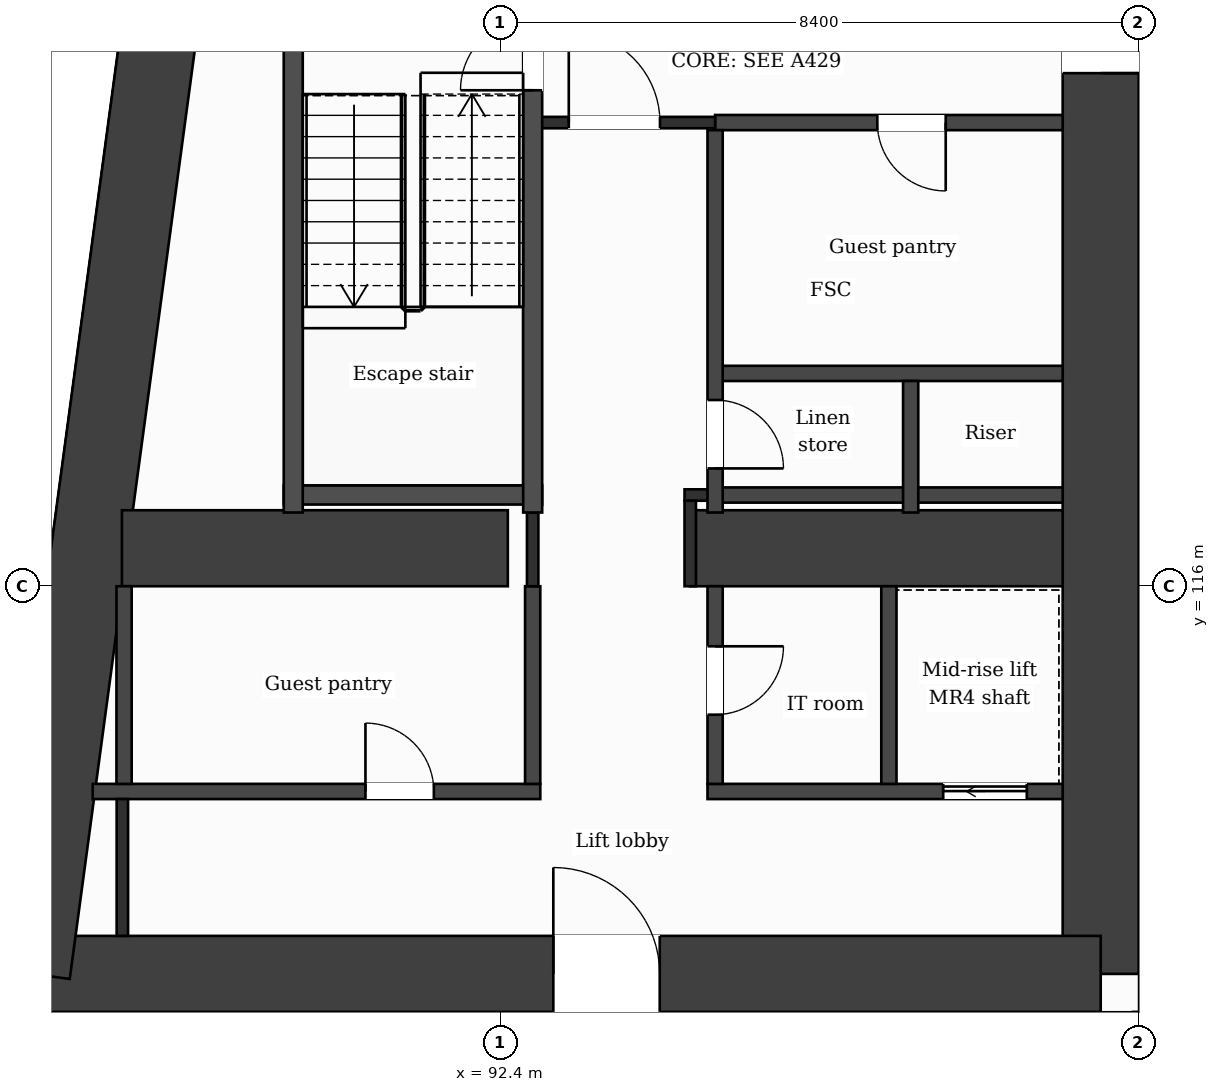
"""IFC4 building model, lengths in metres.
Left out: names, types, materials, properties, quantities, classifications, styles, units other than length and angle.
Written with IfcOpenShell. Run it as: python <this file> out.ifc"""

import sys

from ifc_helpers import new_model, si_unit, direction, frame, frame_2d, origin, place, context, subcontext, project, spatial, rectangle, extrude, element, fill, save


model = new_model("IFC4")
c1 = context("Model", 3, precision=1e-05, world=origin(), true_north=direction((0.0, 1.0)))
c2 = subcontext(c1, "Body", "Model", "MODEL_VIEW")
j1 = project(units=[si_unit("LENGTHUNIT", "METRE"), si_unit("PLANEANGLEUNIT", "RADIAN")], contexts=[c1])
p1 = place(None, origin())
s1 = spatial("IfcSite", under=j1, at=p1, CompositionType="ELEMENT")
p2 = place(p1, origin())
s2 = spatial("IfcBuilding", under=s1, at=p2, CompositionType="ELEMENT")
p3 = place(p2, frame((0.0, 0.0, 120.6)))
s3 = spatial("IfcBuildingStorey", under=s2, at=p3, CompositionType="ELEMENT", Elevation=120.6)
p4 = place(p3, frame((100.3, 131.9, 0.0), z_axis=(0.0, 0.0, 1.0), x_axis=(0.0, -1.0, 0.0)))
e1 = element("IfcWall", 1, at=p4, inside=s3, PredefinedType="SHEAR", context=c2, shape_type="SweptSolid", body=[
    extrude(rectangle(XDim=21.0, YDim=1.0, at=frame_2d((10.5, 0.0))), origin(), (0.0, 0.0, 1.0), 3.7),
])
p5 = place(p4, frame((7.75, 0.0, 0.0)))
e2 = element("IfcOpeningElement", 2, at=p5, cuts=e1, PredefinedType="OPENING", context=c2, shape_type="SweptSolid", body=[
    extrude(rectangle(XDim=1.4, YDim=2.1, at=frame_2d((0.7, 1.05))), frame((0.0, 0.51, 0.0), z_axis=(0.0, -1.0, 0.0), x_axis=(1.0, 0.0, 0.0)), (0.0, 0.0, 1.0), 1.02),
])
p6 = place(p3, frame((100.3, 110.9, 0.0), z_axis=(0.0, 0.0, 1.0), x_axis=(-1.0, 0.0, 0.0)))
e3 = element("IfcWall", 3, at=p6, inside=s3, PredefinedType="SHEAR", context=c2, shape_type="SweptSolid", body=[
    extrude(rectangle(XDim=14.059, YDim=1.0, at=frame_2d((7.03, 0.0))), origin(), (0.0, 0.0, 1.0), 3.7),
])
p7 = place(p6, frame((5.802, 0.0, 0.0)))
e4 = element("IfcOpeningElement", 4, at=p7, cuts=e3, PredefinedType="OPENING", context=c2, shape_type="SweptSolid", body=[
    extrude(rectangle(XDim=1.4, YDim=2.1, at=frame_2d((0.7, 1.05))), frame((0.0, 0.51, 0.0), z_axis=(0.0, -1.0, 0.0), x_axis=(1.0, 0.0, 0.0)), (0.0, 0.0, 1.0), 1.02),
])
p8 = place(p3, frame((86.241, 110.9, 0.0), z_axis=(0.0, 0.0, 1.0), x_axis=(0.133411141623, 0.991060778808, 0.0)))
e5 = element("IfcWall", 5, at=p8, inside=s3, PredefinedType="SHEAR", context=c2, shape_type="SweptSolid", body=[
    extrude(rectangle(XDim=21.189, YDim=1.0, at=frame_2d((10.595, 0.0))), origin(), (0.0, 0.0, 1.0), 3.7),
])
p9 = place(p3, frame((87.423, 116.5, 0.0), z_axis=(0.0, 0.0, 1.0), x_axis=(1.0, 0.0, 0.0)))
e6 = element("IfcWall", 6, at=p9, inside=s3, PredefinedType="SHEAR", context=c2, shape_type="SweptSolid", body=[
    extrude(rectangle(XDim=5.077, YDim=1.0, at=frame_2d((2.539, 0.0))), origin(), (0.0, 0.0, 1.0), 3.7),
])
p10 = place(p3, frame((94.9, 116.5, 0.0), z_axis=(0.0, 0.0, 1.0), x_axis=(1.0, 0.0, 0.0)))
e7 = element("IfcWall", 7, at=p10, inside=s3, PredefinedType="SHEAR", context=c2, shape_type="SweptSolid", body=[
    extrude(rectangle(XDim=4.9, YDim=1.0, at=frame_2d((2.45, 0.0))), origin(), (0.0, 0.0, 1.0), 3.7),
])
p11 = place(p3, frame((87.334, 110.4, 0.0), z_axis=(0.0, 0.0, 1.0), x_axis=(-0.133437175554, -0.991057273915, 0.0)))
e8 = element("IfcWall", 8, at=p11, inside=s3, PredefinedType="SOLIDWALL", context=c2, shape_type="SweptSolid", body=[
    extrude(rectangle(XDim=6.781, YDim=0.3, at=frame_2d((3.39, 0.0))), origin(), (0.0, 0.0, 1.0), 3.38),
])
p12 = place(p11, frame((1.418, 0.0, 0.0)))
e9 = element("IfcOpeningElement", 9, at=p12, cuts=e8, PredefinedType="OPENING", context=c2, shape_type="SweptSolid", body=[
    extrude(rectangle(XDim=1.2, YDim=2.4, at=frame_2d((0.6, 1.2))), frame((0.0, 0.16, 0.0), z_axis=(0.0, -1.0, 0.0), x_axis=(1.0, 0.0, 0.0)), (0.0, 0.0, 1.0), 0.32),
])
p13 = place(p11, frame((4.758, 0.0, 0.9)))
e10 = element("IfcOpeningElement", 10, at=p13, cuts=e8, PredefinedType="OPENING", context=c2, shape_type="SweptSolid", body=[
    extrude(rectangle(XDim=1.2, YDim=2.1, at=frame_2d((0.6, 1.05))), frame((0.0, 0.16, 0.0), z_axis=(0.0, -1.0, 0.0), x_axis=(1.0, 0.0, 0.0)), (0.0, 0.0, 1.0), 0.32),
])
p14 = place(p3, frame((87.039, 113.3, 0.0), z_axis=(0.0, 0.0, 1.0), x_axis=(1.0, 0.0, 0.0)))
e11 = element("IfcWall", 11, at=p14, inside=s3, PredefinedType="PARTITIONING", context=c2, shape_type="SweptSolid", body=[
    extrude(rectangle(XDim=5.888, YDim=0.2, at=frame_2d((2.944, 0.0))), origin(), (0.0, 0.0, 1.0), 3.38),
])
p15 = place(p14, frame((3.588, 0.0, 0.0)))
e12 = element("IfcOpeningElement", 12, at=p15, cuts=e11, PredefinedType="OPENING", context=c2, shape_type="SweptSolid", body=[
    extrude(rectangle(XDim=0.9, YDim=2.1, at=frame_2d((0.45, 1.05))), frame((0.0, 0.11, 0.0), z_axis=(0.0, -1.0, 0.0), x_axis=(1.0, 0.0, 0.0)), (0.0, 0.0, 1.0), 0.22),
])
p16 = place(p3, frame((95.127, 113.3, 0.0), z_axis=(0.0, 0.0, 1.0), x_axis=(1.0, 0.0, 0.0)))
e13 = element("IfcWall", 13, at=p16, inside=s3, PredefinedType="PARTITIONING", context=c2, shape_type="SweptSolid", body=[
    extrude(rectangle(XDim=4.673, YDim=0.2, at=frame_2d((2.336, 0.0))), origin(), (0.0, 0.0, 1.0), 3.38),
])
p17 = place(p16, frame((3.101, 0.0, 0.0)))
e14 = element("IfcOpeningElement", 14, at=p17, cuts=e13, PredefinedType="OPENING", context=c2, shape_type="SweptSolid", body=[
    extrude(rectangle(XDim=1.1, YDim=2.1, at=frame_2d((0.55, 1.05))), frame((0.0, 0.11, 0.0), z_axis=(0.0, -1.0, 0.0), x_axis=(1.0, 0.0, 0.0)), (0.0, 0.0, 1.0), 0.22),
])
p18 = place(p3, frame((95.227, 117.2, 0.0), z_axis=(0.0, 0.0, 1.0), x_axis=(1.0, 0.0, 0.0)))
e15 = element("IfcWall", 15, at=p18, inside=s3, PredefinedType="PARTITIONING", context=c2, shape_type="SweptSolid", body=[
    extrude(rectangle(XDim=4.573, YDim=0.2, at=frame_2d((2.287, 0.0))), origin(), (0.0, 0.0, 1.0), 3.38),
])
p19 = place(p3, frame((94.825, 117.2, 0.0), z_axis=(0.0, 0.0, 1.0), x_axis=(1.0, 0.0, 0.0)))
e16 = element("IfcWall", 16, at=p19, inside=s3, PredefinedType="PARTITIONING", context=c2, shape_type="SweptSolid", body=[
    extrude(rectangle(XDim=0.402, YDim=0.15, at=frame_2d((0.201, 0.0))), origin(), (0.0, 0.0, 1.0), 3.38),
])
p20 = place(p3, frame((89.552, 117.2, 0.0), z_axis=(0.0, 0.0, 1.0), x_axis=(1.0, 0.0, 0.0)))
e17 = element("IfcWall", 17, at=p20, inside=s3, PredefinedType="PARTITIONING", context=c2, shape_type="SweptSolid", body=[
    extrude(rectangle(XDim=3.4, YDim=0.25, at=frame_2d((1.7, 0.0))), origin(), (0.0, 0.0, 1.0), 3.38),
])
p21 = place(p3, frame((95.227, 118.8, 0.0), z_axis=(0.0, 0.0, 1.0), x_axis=(1.0, 0.0, 0.0)))
e18 = element("IfcWall", 18, at=p21, inside=s3, PredefinedType="PARTITIONING", context=c2, shape_type="SweptSolid", body=[
    extrude(rectangle(XDim=4.573, YDim=0.2, at=frame_2d((2.287, 0.0))), origin(), (0.0, 0.0, 1.0), 3.38),
])
p22 = place(p3, frame((95.227, 122.1, 0.0), z_axis=(0.0, 0.0, 1.0), x_axis=(1.0, 0.0, 0.0)))
e19 = element("IfcWall", 19, at=p22, inside=s3, PredefinedType="PARTITIONING", context=c2, shape_type="SweptSolid", body=[
    extrude(rectangle(XDim=4.573, YDim=0.2, at=frame_2d((2.287, 0.0))), origin(), (0.0, 0.0, 1.0), 3.38),
])
p23 = place(p22, frame((2.134, 0.0, 0.0)))
e20 = element("IfcOpeningElement", 20, at=p23, cuts=e19, PredefinedType="OPENING", context=c2, shape_type="SweptSolid", body=[
    extrude(rectangle(XDim=0.9, YDim=2.1, at=frame_2d((0.45, 1.05))), frame((0.0, 0.11, 0.0), z_axis=(0.0, -1.0, 0.0), x_axis=(1.0, 0.0, 0.0)), (0.0, 0.0, 1.0), 0.22),
])
p24 = place(p3, frame((92.827, 122.1, 0.0), z_axis=(0.0, 0.0, 1.0), x_axis=(1.0, 0.0, 0.0)))
e21 = element("IfcWall", 21, at=p24, inside=s3, PredefinedType="PARTITIONING", context=c2, shape_type="SweptSolid", body=[
    extrude(rectangle(XDim=2.4, YDim=0.15, at=frame_2d((1.2, 0.0))), origin(), (0.0, 0.0, 1.0), 3.38),
])
p25 = place(p24, frame((0.475, 0.0, 0.0)))
e22 = element("IfcOpeningElement", 22, at=p25, cuts=e21, PredefinedType="OPENING", context=c2, shape_type="SweptSolid", body=[
    extrude(rectangle(XDim=1.2, YDim=2.1, at=frame_2d((0.6, 1.05))), frame((0.0, 0.085, 0.0), z_axis=(0.0, -1.0, 0.0), x_axis=(1.0, 0.0, 0.0)), (0.0, 0.0, 1.0), 0.17),
])
p26 = place(p3, frame((87.451, 113.4, 0.0), z_axis=(0.0, 0.0, 1.0), x_axis=(0.0, 1.0, 0.0)))
e23 = element("IfcWall", 23, at=p26, inside=s3, PredefinedType="PARTITIONING", context=c2, shape_type="SweptSolid", body=[
    extrude(rectangle(XDim=2.6, YDim=0.2, at=frame_2d((1.3, 0.0))), origin(), (0.0, 0.0, 1.0), 3.38),
])
p27 = place(p3, frame((87.429, 111.4, 0.0), z_axis=(0.0, 0.0, 1.0), x_axis=(0.0, 1.0, 0.0)))
e24 = element("IfcWall", 24, at=p27, inside=s3, PredefinedType="PARTITIONING", context=c2, shape_type="SweptSolid", body=[
    extrude(rectangle(XDim=1.8, YDim=0.15, at=frame_2d((0.9, 0.0))), origin(), (0.0, 0.0, 1.0), 3.38),
])
p28 = place(p3, frame((89.677, 116.97, 0.0), z_axis=(0.0, 0.0, 1.0), x_axis=(0.0, 1.0, 0.0)))
e25 = element("IfcWall", 25, at=p28, inside=s3, PredefinedType="PARTITIONING", context=c2, shape_type="SweptSolid", body=[
    extrude(rectangle(XDim=6.855, YDim=0.25, at=frame_2d((3.427, 0.0))), origin(), (0.0, 0.0, 1.0), 3.38),
])
p29 = place(p3, frame((92.827, 113.4, 0.0), z_axis=(0.0, 0.0, 1.0), x_axis=(0.0, 1.0, 0.0)))
e26 = element("IfcWall", 26, at=p29, inside=s3, PredefinedType="PARTITIONING", context=c2, shape_type="SweptSolid", body=[
    extrude(rectangle(XDim=2.6, YDim=0.2, at=frame_2d((1.3, 0.0))), origin(), (0.0, 0.0, 1.0), 3.38),
])
p30 = place(p3, frame((92.827, 116.0, 0.0), z_axis=(0.0, 0.0, 1.0), x_axis=(0.0, 1.0, 0.0)))
e27 = element("IfcWall", 27, at=p30, inside=s3, PredefinedType="PARTITIONING", context=c2, shape_type="SweptSolid", body=[
    extrude(rectangle(XDim=0.97, YDim=0.15, at=frame_2d((0.485, 0.0))), origin(), (0.0, 0.0, 1.0), 3.38),
])
p31 = place(p3, frame((92.827, 116.97, 0.0), z_axis=(0.0, 0.0, 1.0), x_axis=(0.0, 1.0, 0.0)))
e28 = element("IfcWall", 28, at=p31, inside=s3, PredefinedType="PARTITIONING", context=c2, shape_type="SweptSolid", body=[
    extrude(rectangle(XDim=6.855, YDim=0.25, at=frame_2d((3.427, 0.0))), origin(), (0.0, 0.0, 1.0), 3.38),
])
p32 = place(p31, frame((5.555, 0.0, 0.0)))
e29 = element("IfcOpeningElement", 29, at=p32, cuts=e28, PredefinedType="OPENING", context=c2, shape_type="SweptSolid", body=[
    extrude(rectangle(XDim=0.95, YDim=2.1, at=frame_2d((0.475, 1.05))), frame((0.0, 0.135, 0.0), z_axis=(0.0, -1.0, 0.0), x_axis=(1.0, 0.0, 0.0)), (0.0, 0.0, 1.0), 0.27),
])
p33 = place(p3, frame((94.9, 116.0, 0.0), z_axis=(0.0, 0.0, 1.0), x_axis=(0.0, 1.0, 0.0)))
e30 = element("IfcWall", 30, at=p33, inside=s3, PredefinedType="PARTITIONING", context=c2, shape_type="SweptSolid", body=[
    extrude(rectangle(XDim=1.125, YDim=0.15, at=frame_2d((0.562, 0.0))), origin(), (0.0, 0.0, 1.0), 3.38),
])
p34 = place(p3, frame((95.227, 113.4, 0.0), z_axis=(0.0, 0.0, 1.0), x_axis=(0.0, 1.0, 0.0)))
e31 = element("IfcWall", 31, at=p34, inside=s3, PredefinedType="PARTITIONING", context=c2, shape_type="SweptSolid", body=[
    extrude(rectangle(XDim=2.6, YDim=0.2, at=frame_2d((1.3, 0.0))), origin(), (0.0, 0.0, 1.0), 3.38),
])
p35 = place(p34, frame((0.91, 0.0, 0.0)))
e32 = element("IfcOpeningElement", 32, at=p35, cuts=e31, PredefinedType="OPENING", context=c2, shape_type="SweptSolid", body=[
    extrude(rectangle(XDim=0.9, YDim=2.1, at=frame_2d((0.45, 1.05))), frame((0.0, 0.11, 0.0), z_axis=(0.0, -1.0, 0.0), x_axis=(1.0, 0.0, 0.0)), (0.0, 0.0, 1.0), 0.22),
])
p36 = place(p3, frame((95.227, 116.97, 0.0), z_axis=(0.0, 0.0, 1.0), x_axis=(0.0, 1.0, 0.0)))
e33 = element("IfcWall", 33, at=p36, inside=s3, PredefinedType="PARTITIONING", context=c2, shape_type="SweptSolid", body=[
    extrude(rectangle(XDim=5.03, YDim=0.2, at=frame_2d((2.515, 0.0))), origin(), (0.0, 0.0, 1.0), 3.38),
])
p37 = place(p36, frame((0.58, 0.0, 0.0)))
e34 = element("IfcOpeningElement", 34, at=p37, cuts=e33, PredefinedType="OPENING", context=c2, shape_type="SweptSolid", body=[
    extrude(rectangle(XDim=0.9, YDim=2.1, at=frame_2d((0.45, 1.05))), frame((0.0, 0.11, 0.0), z_axis=(0.0, -1.0, 0.0), x_axis=(1.0, 0.0, 0.0)), (0.0, 0.0, 1.0), 0.22),
])
p38 = place(p3, frame((97.513, 113.4, 0.0), z_axis=(0.0, 0.0, 1.0), x_axis=(0.0, 1.0, 0.0)))
e35 = element("IfcWall", 35, at=p38, inside=s3, PredefinedType="PARTITIONING", context=c2, shape_type="SweptSolid", body=[
    extrude(rectangle(XDim=2.6, YDim=0.2, at=frame_2d((1.3, 0.0))), origin(), (0.0, 0.0, 1.0), 3.38),
])
p39 = place(p3, frame((97.8, 116.97, 0.0), z_axis=(0.0, 0.0, 1.0), x_axis=(0.0, 1.0, 0.0)))
e36 = element("IfcWall", 36, at=p39, inside=s3, PredefinedType="PARTITIONING", context=c2, shape_type="SweptSolid", body=[
    extrude(rectangle(XDim=1.73, YDim=0.2, at=frame_2d((0.865, 0.0))), origin(), (0.0, 0.0, 1.0), 3.38),
])
p40 = place(p3, frame((100.8, 109.075, 0.0), z_axis=(0.0, 0.0, 1.0), x_axis=(0.0, 1.0, 0.0)))
e37 = element("IfcWall", 37, at=p40, inside=s3, PredefinedType="PARTITIONING", context=c2, shape_type="SweptSolid", body=[
    extrude(rectangle(XDim=1.325, YDim=0.15, at=frame_2d((0.663, 0.0))), origin(), (0.0, 0.0, 1.0), 3.38),
])
p41 = place(p25, origin())
e38 = element("IfcDoor", 38, at=p41, inside=s3, OperationType="SINGLE_SWING_LEFT", PredefinedType="DOOR", context=c2, shape_type="SweptSolid", body=[
    extrude(rectangle(XDim=1.2, YDim=2.1, at=frame_2d((0.6, 1.05))), frame((0.0, 0.025, 0.0), z_axis=(0.0, -1.0, 0.0), x_axis=(1.0, 0.0, 0.0)), (0.0, 0.0, 1.0), 0.05),
])
fill(e22, e38)
p42 = place(p23, origin())
e39 = element("IfcDoor", 39, at=p42, inside=s3, OperationType="SINGLE_SWING_RIGHT", PredefinedType="DOOR", context=c2, shape_type="SweptSolid", body=[
    extrude(rectangle(XDim=0.9, YDim=2.1, at=frame_2d((0.45, 1.05))), frame((0.0, 0.025, 0.0), z_axis=(0.0, -1.0, 0.0), x_axis=(1.0, 0.0, 0.0)), (0.0, 0.0, 1.0), 0.05),
])
fill(e20, e39)
p43 = place(p32, origin())
e40 = element("IfcDoor", 40, at=p43, inside=s3, OperationType="SINGLE_SWING_LEFT", PredefinedType="DOOR", context=c2, shape_type="SweptSolid", body=[
    extrude(rectangle(XDim=0.95, YDim=2.1, at=frame_2d((0.475, 1.05))), frame((0.0, 0.025, 0.0), z_axis=(0.0, -1.0, 0.0), x_axis=(1.0, 0.0, 0.0)), (0.0, 0.0, 1.0), 0.05),
])
fill(e29, e40)
p44 = place(p37, origin())
e41 = element("IfcDoor", 41, at=p44, inside=s3, OperationType="SINGLE_SWING_LEFT", PredefinedType="DOOR", context=c2, shape_type="SweptSolid", body=[
    extrude(rectangle(XDim=0.9, YDim=2.1, at=frame_2d((0.45, 1.05))), frame((0.0, 0.025, 0.0), z_axis=(0.0, -1.0, 0.0), x_axis=(1.0, 0.0, 0.0)), (0.0, 0.0, 1.0), 0.05),
])
fill(e34, e41)
p45 = place(p17, origin())
e42 = element("IfcDoor", 42, at=p45, inside=s3, OperationType="SLIDING_TO_LEFT", PredefinedType="DOOR", context=c2, shape_type="SweptSolid", body=[
    extrude(rectangle(XDim=1.1, YDim=2.1, at=frame_2d((0.55, 1.05))), frame((0.0, 0.025, 0.0), z_axis=(0.0, -1.0, 0.0), x_axis=(1.0, 0.0, 0.0)), (0.0, 0.0, 1.0), 0.05),
])
fill(e14, e42)
p46 = place(p15, origin())
e43 = element("IfcDoor", 43, at=p46, inside=s3, OperationType="SINGLE_SWING_LEFT", PredefinedType="DOOR", context=c2, shape_type="SweptSolid", body=[
    extrude(rectangle(XDim=0.9, YDim=2.1, at=frame_2d((0.45, 1.05))), frame((0.0, 0.025, 0.0), z_axis=(0.0, -1.0, 0.0), x_axis=(1.0, 0.0, 0.0)), (0.0, 0.0, 1.0), 0.05),
])
fill(e12, e43)
p47 = place(p35, origin())
e44 = element("IfcDoor", 44, at=p47, inside=s3, OperationType="SINGLE_SWING_RIGHT", PredefinedType="DOOR", context=c2, shape_type="SweptSolid", body=[
    extrude(rectangle(XDim=0.9, YDim=2.1, at=frame_2d((0.45, 1.05))), frame((0.0, 0.025, 0.0), z_axis=(0.0, -1.0, 0.0), x_axis=(1.0, 0.0, 0.0)), (0.0, 0.0, 1.0), 0.05),
])
fill(e32, e44)
p48 = place(p7, origin())
e45 = element("IfcDoor", 45, at=p48, inside=s3, OperationType="SINGLE_SWING_RIGHT", PredefinedType="DOOR", context=c2, shape_type="SweptSolid", body=[
    extrude(rectangle(XDim=1.4, YDim=2.1, at=frame_2d((0.7, 1.05))), frame((0.0, 0.025, 0.0), z_axis=(0.0, -1.0, 0.0), x_axis=(1.0, 0.0, 0.0)), (0.0, 0.0, 1.0), 0.05),
])
fill(e4, e45)
p49 = place(p5, origin())
e46 = element("IfcDoor", 46, at=p49, inside=s3, OperationType="SINGLE_SWING_RIGHT", PredefinedType="DOOR", context=c2, shape_type="SweptSolid", body=[
    extrude(rectangle(XDim=1.4, YDim=2.1, at=frame_2d((0.7, 1.05))), frame((0.0, 0.025, 0.0), z_axis=(0.0, -1.0, 0.0), x_axis=(1.0, 0.0, 0.0)), (0.0, 0.0, 1.0), 0.05),
])
fill(e2, e46)
save(model, sys.argv[1])
